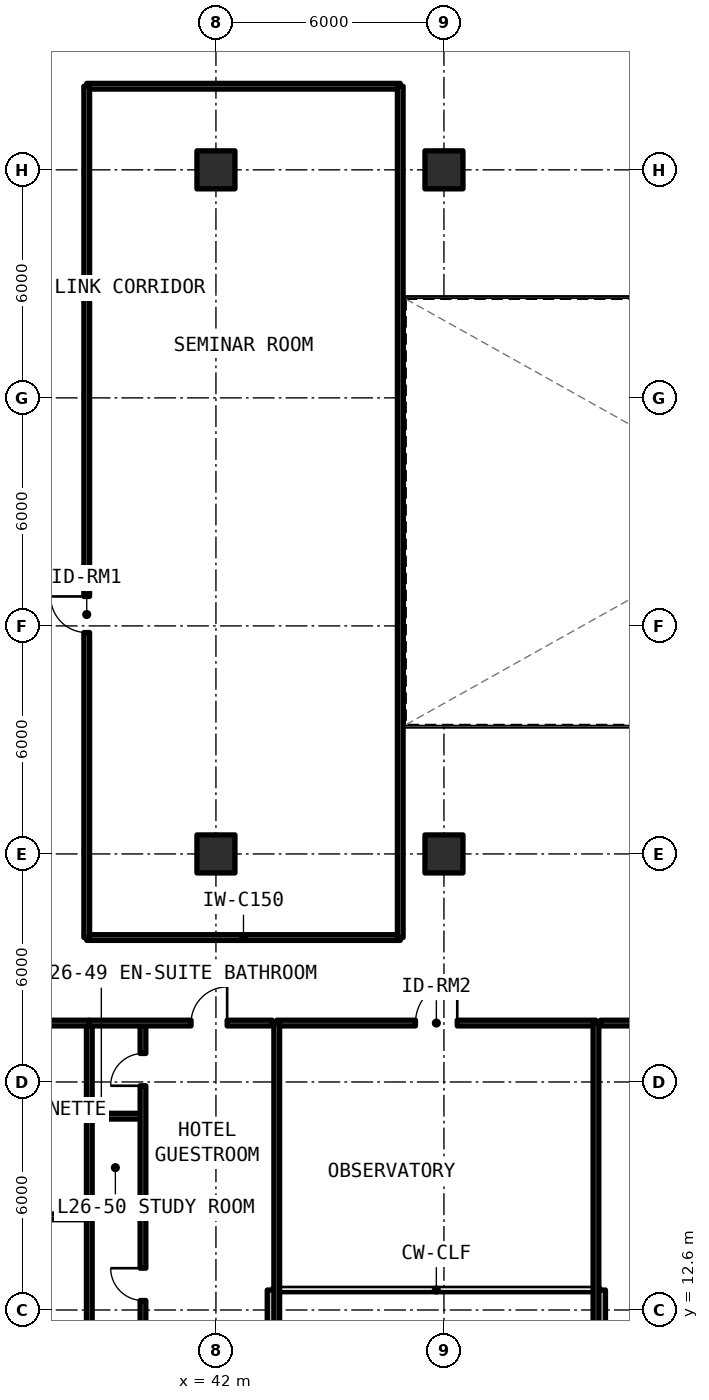
"""IFC4 building model, lengths in metres.
Left out: names, types, materials, properties, quantities, classifications, styles, units other than length and angle.
Written with IfcOpenShell. Run it as: python <this file> out.ifc"""

import sys

from ifc_helpers import new_model, si_unit, direction, frame, frame_2d, origin, origin_2d, place, context, subcontext, project, spatial, rectangle, extrude, element, fill, save


model = new_model("IFC4")
c1 = context("Model", 3, precision=1e-05, world=origin(), true_north=direction((0.0, 1.0)))
c2 = subcontext(c1, "Body", "Model", "MODEL_VIEW")
j1 = project(units=[si_unit("LENGTHUNIT", "METRE"), si_unit("PLANEANGLEUNIT", "RADIAN")], contexts=[c1])
p1 = place(None, origin())
s1 = spatial("IfcSite", under=j1, at=p1, CompositionType="ELEMENT")
p2 = place(p1, origin())
s2 = spatial("IfcBuilding", under=s1, at=p2, CompositionType="ELEMENT")
p3 = place(p2, frame((0.0, 0.0, 95.37)))
s3 = spatial("IfcBuildingStorey", under=s2, at=p3, CompositionType="ELEMENT", Elevation=95.37)
for number, where, z_axis, x_axis in (
    (1, (42.0, 24.6, 0.0), (0.0, 0.0, 1.0), (1.0, 0.0, 0.0)),
    (2, (42.0, 42.6, 0.0), (0.0, 0.0, 1.0), (1.0, 0.0, 0.0)),
    (3, (48.0, 24.6, 0.0), (0.0, 0.0, 1.0), (1.0, 0.0, 0.0)),
    (4, (48.0, 42.6, 0.0), (0.0, 0.0, 1.0), (1.0, 0.0, 0.0)),
):
    element("IfcColumn", number, at=place(p3, frame(where, z_axis=z_axis, x_axis=x_axis)), inside=s3, PredefinedType="COLUMN", context=c2, shape_type="SweptSolid", body=[
        extrude(rectangle(XDim=1.0, YDim=1.0, at=origin_2d()), origin(), (0.0, 0.0, 1.0), 3.3),
    ])
for number, where, z_axis, x_axis in (
    (5, (43.475, 9.725, 0.0), (0.0, 0.0, 1.0), (0.0, 1.0, 0.0)),
    (6, (52.125, 13.125, 0.0), (0.0, 0.0, 1.0), (0.0, -1.0, 0.0)),
):
    element("IfcWall", number, at=place(p3, frame(where, z_axis=z_axis, x_axis=x_axis)), inside=s3, PredefinedType="SOLIDWALL", context=c2, shape_type="SweptSolid", body=[
        extrude(rectangle(XDim=3.4, YDim=0.25, at=frame_2d((1.7, 0.0))), origin(), (0.0, 0.0, 1.0), 3.08),
    ])
for number, where, z_axis, x_axis in (
    (7, (38.6, 22.4, 0.0), (0.0, 0.0, 1.0), (1.0, 0.0, 0.0)),
    (8, (38.6, 44.8, 0.0), (0.0, 0.0, 1.0), (1.0, 0.0, 0.0)),
):
    element("IfcWall", number, at=place(p3, frame(where, z_axis=z_axis, x_axis=x_axis)), inside=s3, PredefinedType="SOLIDWALL", context=c2, shape_type="SweptSolid", body=[
        extrude(rectangle(XDim=8.25, YDim=0.15, at=frame_2d((4.125, 0.0))), origin(), (0.0, 0.0, 1.0), 2.35),
    ])
p4 = place(p3, frame((38.6, 22.4, 0.0), z_axis=(0.0, 0.0, 1.0), x_axis=(0.0, 1.0, 0.0)))
e9 = element("IfcWall", 9, at=p4, inside=s3, PredefinedType="SOLIDWALL", context=c2, shape_type="SweptSolid", body=[
    extrude(rectangle(XDim=22.4, YDim=0.15, at=frame_2d((11.2, 0.0))), origin(), (0.0, 0.0, 1.0), 2.35),
])
p5 = place(p4, frame((8.025, 0.0, 0.0)))
e10 = element("IfcOpeningElement", 10, at=p5, cuts=e9, PredefinedType="OPENING", context=c2, shape_type="SweptSolid", body=[
    extrude(rectangle(XDim=0.95, YDim=2.15, at=frame_2d((0.475, 1.075))), frame((0.0, 0.085, 0.0), z_axis=(0.0, -1.0, 0.0), x_axis=(1.0, 0.0, 0.0)), (0.0, 0.0, 1.0), 0.17),
])
p6 = place(p3, frame((46.85, 22.4, 0.0), z_axis=(0.0, 0.0, 1.0), x_axis=(0.0, 1.0, 0.0)))
e11 = element("IfcWall", 11, at=p6, inside=s3, PredefinedType="SOLIDWALL", context=c2, shape_type="SweptSolid", body=[
    extrude(rectangle(XDim=22.4, YDim=0.15, at=frame_2d((11.2, 0.0))), origin(), (0.0, 0.0, 1.0), 2.35),
])
p7 = place(p3, frame((43.6, 20.15, 0.0), z_axis=(0.0, 0.0, 1.0), x_axis=(1.0, 0.0, 0.0)))
e12 = element("IfcWall", 12, at=p7, inside=s3, PredefinedType="SOLIDWALL", context=c2, shape_type="SweptSolid", body=[
    extrude(rectangle(XDim=8.4, YDim=0.15, at=frame_2d((4.2, 0.0))), origin(), (0.0, 0.0, 1.0), 2.35),
])
p8 = place(p7, frame((3.65, 0.0, 0.0)))
e13 = element("IfcOpeningElement", 13, at=p8, cuts=e12, PredefinedType="OPENING", context=c2, shape_type="SweptSolid", body=[
    extrude(rectangle(XDim=1.1, YDim=2.15, at=frame_2d((0.55, 1.075))), frame((0.0, 0.085, 0.0), z_axis=(0.0, -1.0, 0.0), x_axis=(1.0, 0.0, 0.0)), (0.0, 0.0, 1.0), 0.17),
])
for number, where, z_axis, x_axis in (
    (14, (43.6, 9.85, 0.0), (0.0, 0.0, 1.0), (0.0, 1.0, 0.0)),
    (15, (52.0, 9.85, 0.0), (0.0, 0.0, 1.0), (0.0, 1.0, 0.0)),
    (16, (38.667, 9.85, 0.0), (0.0, 0.0, 1.0), (0.0, 1.0, 0.0)),
):
    element("IfcWall", number, at=place(p3, frame(where, z_axis=z_axis, x_axis=x_axis)), inside=s3, PredefinedType="SOLIDWALL", context=c2, shape_type="SweptSolid", body=[
        extrude(rectangle(XDim=10.3, YDim=0.15, at=frame_2d((5.15, 0.0))), origin(), (0.0, 0.0, 1.0), 2.35),
    ])
p9 = place(p3, frame((30.468, 15.05, 0.0), z_axis=(0.0, 0.0, 1.0), x_axis=(1.0, 0.0, 0.0)))
e17 = element("IfcWall", 17, at=p9, inside=s3, PredefinedType="PARTITIONING", context=c2, shape_type="SweptSolid", body=[
    extrude(rectangle(XDim=8.199, YDim=0.15, at=frame_2d((4.1, 0.0))), origin(), (0.0, 0.0, 1.0), 2.35),
])
p10 = place(p9, frame((2.882, 0.0, 0.0)))
e18 = element("IfcOpeningElement", 18, at=p10, cuts=e17, PredefinedType="OPENING", context=c2, shape_type="SweptSolid", body=[
    extrude(rectangle(XDim=0.85, YDim=2.1, at=frame_2d((0.425, 1.05))), frame((0.0, 0.085, 0.0), z_axis=(0.0, -1.0, 0.0), x_axis=(1.0, 0.0, 0.0)), (0.0, 0.0, 1.0), 0.17),
])
p11 = place(p9, frame((5.806, 0.0, 0.0)))
e19 = element("IfcOpeningElement", 19, at=p11, cuts=e17, PredefinedType="OPENING", context=c2, shape_type="SweptSolid", body=[
    extrude(rectangle(XDim=0.85, YDim=2.1, at=frame_2d((0.425, 1.05))), frame((0.0, 0.085, 0.0), z_axis=(0.0, -1.0, 0.0), x_axis=(1.0, 0.0, 0.0)), (0.0, 0.0, 1.0), 0.17),
])
p12 = place(p3, frame((30.468, 20.15, 0.0), z_axis=(0.0, 0.0, 1.0), x_axis=(1.0, 0.0, 0.0)))
e20 = element("IfcWall", 20, at=p12, inside=s3, PredefinedType="SOLIDWALL", context=c2, shape_type="SweptSolid", body=[
    extrude(rectangle(XDim=8.199, YDim=0.15, at=frame_2d((4.1, 0.0))), origin(), (0.0, 0.0, 1.0), 2.35),
])
p13 = place(p12, frame((4.84, 0.0, 0.0)))
e21 = element("IfcOpeningElement", 21, at=p13, cuts=e20, PredefinedType="OPENING", context=c2, shape_type="SweptSolid", body=[
    extrude(rectangle(XDim=0.95, YDim=2.15, at=frame_2d((0.475, 1.075))), frame((0.0, 0.085, 0.0), z_axis=(0.0, -1.0, 0.0), x_axis=(1.0, 0.0, 0.0)), (0.0, 0.0, 1.0), 0.17),
])
p14 = place(p3, frame((38.667, 17.7, 0.0), z_axis=(0.0, 0.0, 1.0), x_axis=(1.0, 0.0, 0.0)))
e22 = element("IfcWall", 22, at=p14, inside=s3, PredefinedType="PARTITIONING", context=c2, shape_type="SweptSolid", body=[
    extrude(rectangle(XDim=1.413, YDim=0.15, at=frame_2d((0.707, 0.0))), origin(), (0.0, 0.0, 1.0), 2.35),
])
p15 = place(p3, frame((40.08, 9.85, 0.0), z_axis=(0.0, 0.0, 1.0), x_axis=(0.0, 1.0, 0.0)))
e23 = element("IfcWall", 23, at=p15, inside=s3, PredefinedType="PARTITIONING", context=c2, shape_type="SweptSolid", body=[
    extrude(rectangle(XDim=10.3, YDim=0.15, at=frame_2d((5.15, 0.0))), origin(), (0.0, 0.0, 1.0), 2.35),
])
p16 = place(p15, frame((3.0, 0.0, 0.0)))
e24 = element("IfcOpeningElement", 24, at=p16, cuts=e23, PredefinedType="OPENING", context=c2, shape_type="SweptSolid", body=[
    extrude(rectangle(XDim=0.85, YDim=2.1, at=frame_2d((0.425, 1.05))), frame((0.0, 0.085, 0.0), z_axis=(0.0, -1.0, 0.0), x_axis=(1.0, 0.0, 0.0)), (0.0, 0.0, 1.0), 0.17),
])
p17 = place(p15, frame((8.65, 0.0, 0.0)))
e25 = element("IfcOpeningElement", 25, at=p17, cuts=e23, PredefinedType="OPENING", context=c2, shape_type="SweptSolid", body=[
    extrude(rectangle(XDim=0.85, YDim=2.1, at=frame_2d((0.425, 1.05))), frame((0.0, 0.085, 0.0), z_axis=(0.0, -1.0, 0.0), x_axis=(1.0, 0.0, 0.0)), (0.0, 0.0, 1.0), 0.17),
])
p18 = place(p3, frame((38.667, 20.15, 0.0), z_axis=(0.0, 0.0, 1.0), x_axis=(1.0, 0.0, 0.0)))
e26 = element("IfcWall", 26, at=p18, inside=s3, PredefinedType="SOLIDWALL", context=c2, shape_type="SweptSolid", body=[
    extrude(rectangle(XDim=4.813, YDim=0.15, at=frame_2d((2.406, 0.0))), origin(), (0.0, 0.0, 1.0), 2.35),
])
p19 = place(p18, frame((2.678, 0.0, 0.0)))
e27 = element("IfcOpeningElement", 27, at=p19, cuts=e26, PredefinedType="OPENING", context=c2, shape_type="SweptSolid", body=[
    extrude(rectangle(XDim=0.95, YDim=2.15, at=frame_2d((0.475, 1.075))), frame((0.0, 0.085, 0.0), z_axis=(0.0, -1.0, 0.0), x_axis=(1.0, 0.0, 0.0)), (0.0, 0.0, 1.0), 0.17),
])
p20 = place(p3, frame((52.12, 20.15, 0.0), z_axis=(0.0, 0.0, 1.0), x_axis=(1.0, 0.0, 0.0)))
e28 = element("IfcWall", 28, at=p20, inside=s3, PredefinedType="SOLIDWALL", context=c2, shape_type="SweptSolid", body=[
    extrude(rectangle(XDim=6.776, YDim=0.15, at=frame_2d((3.388, 0.0))), origin(), (0.0, 0.0, 1.0), 2.35),
])
p21 = place(p20, frame((2.913, 0.0, 0.0)))
e29 = element("IfcOpeningElement", 29, at=p21, cuts=e28, PredefinedType="OPENING", context=c2, shape_type="SweptSolid", body=[
    extrude(rectangle(XDim=0.95, YDim=2.15, at=frame_2d((0.475, 1.075))), frame((0.0, 0.085, 0.0), z_axis=(0.0, -1.0, 0.0), x_axis=(1.0, 0.0, 0.0)), (0.0, 0.0, 1.0), 0.17),
])
p22 = place(p5, origin())
e30 = element("IfcDoor", 30, at=p22, inside=s3, OperationType="SINGLE_SWING_RIGHT", PredefinedType="DOOR", context=c2, shape_type="SweptSolid", body=[
    extrude(rectangle(XDim=0.95, YDim=2.15, at=frame_2d((0.475, 1.075))), frame((0.0, 0.025, 0.0), z_axis=(0.0, -1.0, 0.0), x_axis=(1.0, 0.0, 0.0)), (0.0, 0.0, 1.0), 0.05),
])
fill(e10, e30)
p23 = place(p8, origin())
e31 = element("IfcDoor", 31, at=p23, inside=s3, OperationType="SINGLE_SWING_RIGHT", PredefinedType="DOOR", context=c2, shape_type="SweptSolid", body=[
    extrude(rectangle(XDim=1.1, YDim=2.15, at=frame_2d((0.55, 1.075))), frame((0.0, 0.025, 0.0), z_axis=(0.0, -1.0, 0.0), x_axis=(1.0, 0.0, 0.0)), (0.0, 0.0, 1.0), 0.05),
])
fill(e13, e31)
p24 = place(p16, origin())
e32 = element("IfcDoor", 32, at=p24, inside=s3, OperationType="SINGLE_SWING_RIGHT", PredefinedType="DOOR", context=c2, shape_type="SweptSolid", body=[
    extrude(rectangle(XDim=0.85, YDim=2.1, at=frame_2d((0.425, 1.05))), frame((0.0, 0.025, 0.0), z_axis=(0.0, -1.0, 0.0), x_axis=(1.0, 0.0, 0.0)), (0.0, 0.0, 1.0), 0.05),
])
fill(e24, e32)
p25 = place(p17, origin())
e33 = element("IfcDoor", 33, at=p25, inside=s3, OperationType="SINGLE_SWING_LEFT", PredefinedType="DOOR", context=c2, shape_type="SweptSolid", body=[
    extrude(rectangle(XDim=0.85, YDim=2.1, at=frame_2d((0.425, 1.05))), frame((0.0, 0.025, 0.0), z_axis=(0.0, -1.0, 0.0), x_axis=(1.0, 0.0, 0.0)), (0.0, 0.0, 1.0), 0.05),
])
fill(e25, e33)
p26 = place(p19, origin())
e34 = element("IfcDoor", 34, at=p26, inside=s3, OperationType="SINGLE_SWING_RIGHT", PredefinedType="DOOR", context=c2, shape_type="SweptSolid", body=[
    extrude(rectangle(XDim=0.95, YDim=2.15, at=frame_2d((0.475, 1.075))), frame((0.0, 0.025, 0.0), z_axis=(0.0, -1.0, 0.0), x_axis=(1.0, 0.0, 0.0)), (0.0, 0.0, 1.0), 0.05),
])
fill(e27, e34)
save(model, sys.argv[1])
